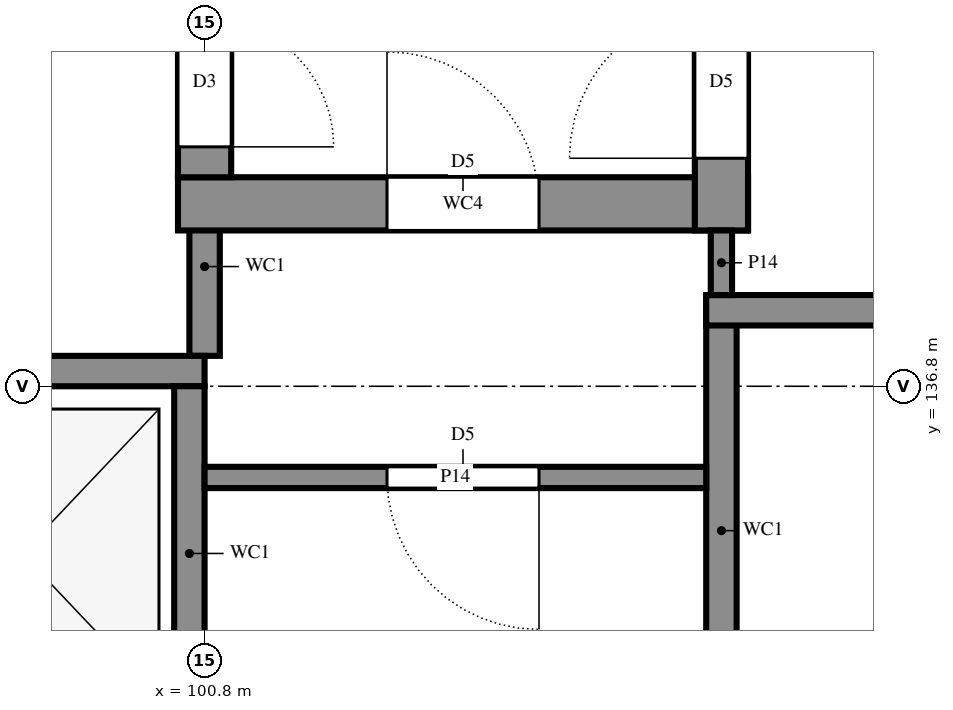
"""IFC4 building model, lengths in metres.
Left out: names, types, materials, properties, quantities, classifications, styles, units other than length and angle.
Written with IfcOpenShell. Run it as: python <this file> out.ifc"""

import sys

from ifc_helpers import new_model, si_unit, direction, frame, frame_2d, origin, place, context, subcontext, project, spatial, rectangle, extrude, element, fill, save


model = new_model("IFC4")
c1 = context("Model", 3, precision=1e-05, world=origin(), true_north=direction((0.0, 1.0)))
c2 = subcontext(c1, "Body", "Model", "MODEL_VIEW")
j1 = project(units=[si_unit("LENGTHUNIT", "METRE"), si_unit("PLANEANGLEUNIT", "RADIAN")], contexts=[c1])
p1 = place(None, origin())
s1 = spatial("IfcSite", under=j1, at=p1, CompositionType="ELEMENT")
p2 = place(p1, origin())
s2 = spatial("IfcBuilding", under=s1, at=p2, CompositionType="ELEMENT")
p3 = place(p2, frame((0.0, 0.0, 7.2)))
s3 = spatial("IfcBuildingStorey", under=s2, at=p3, CompositionType="ELEMENT", Elevation=7.2)
p4 = place(p3, frame((100.8, 137.0, 0.0), z_axis=(0.0, 0.0, 1.0), x_axis=(0.0, 1.0, 0.0)))
e1 = element("IfcWall", 1, at=p4, inside=s3, PredefinedType="SHEAR", context=c2, shape_type="SweptSolid", body=[
    extrude(rectangle(XDim=1.175, YDim=0.2, at=frame_2d((0.587, 0.0))), origin(), (0.0, 0.0, 1.0), 3.6),
])
p5 = place(p3, frame((104.2, 137.4, 0.0), z_axis=(0.0, 0.0, 1.0), x_axis=(0.0, -1.0, 0.0)))
e2 = element("IfcWall", 2, at=p5, inside=s3, PredefinedType="SHEAR", context=c2, shape_type="SweptSolid", body=[
    extrude(rectangle(XDim=3.1, YDim=0.2, at=frame_2d((1.55, 0.0))), origin(), (0.0, 0.0, 1.0), 3.6),
])
p6 = place(p3, frame((108.2, 137.3, 0.0), z_axis=(0.0, 0.0, 1.0), x_axis=(-1.0, 0.0, 0.0)))
e3 = element("IfcWall", 3, at=p6, inside=s3, PredefinedType="SHEAR", context=c2, shape_type="SweptSolid", body=[
    extrude(rectangle(XDim=4.1, YDim=0.2, at=frame_2d((2.05, 0.0))), origin(), (0.0, 0.0, 1.0), 3.6),
])
p7 = place(p3, frame((100.625, 138.0, 0.0), z_axis=(0.0, 0.0, 1.0), x_axis=(1.0, 0.0, 0.0)))
e4 = element("IfcWall", 4, at=p7, inside=s3, PredefinedType="SHEAR", context=c2, shape_type="SweptSolid", body=[
    extrude(rectangle(XDim=3.75, YDim=0.35, at=frame_2d((1.875, 0.0))), origin(), (0.0, 0.0, 1.0), 3.6),
])
p8 = place(p7, frame((1.375, 0.0, 0.0)))
e5 = element("IfcOpeningElement", 5, at=p8, cuts=e4, PredefinedType="OPENING", context=c2, shape_type="SweptSolid", body=[
    extrude(rectangle(XDim=1.0, YDim=2.1, at=frame_2d((0.5, 1.05))), frame((0.0, 0.185, 0.0), z_axis=(0.0, -1.0, 0.0), x_axis=(1.0, 0.0, 0.0)), (0.0, 0.0, 1.0), 0.37),
])
p9 = place(p3, frame((104.2, 137.825, 0.0), z_axis=(0.0, 0.0, 1.0), x_axis=(0.0, 1.0, 0.0)))
e6 = element("IfcWall", 6, at=p9, inside=s3, PredefinedType="SHEAR", context=c2, shape_type="SweptSolid", body=[
    extrude(rectangle(XDim=3.475, YDim=0.35, at=frame_2d((1.738, 0.0))), origin(), (0.0, 0.0, 1.0), 3.6),
])
p10 = place(p9, frame((0.475, 0.0, 0.0)))
e7 = element("IfcOpeningElement", 7, at=p10, cuts=e6, PredefinedType="OPENING", context=c2, shape_type="SweptSolid", body=[
    extrude(rectangle(XDim=1.0, YDim=2.1, at=frame_2d((0.5, 1.05))), frame((0.0, 0.185, 0.0), z_axis=(0.0, -1.0, 0.0), x_axis=(1.0, 0.0, 0.0)), (0.0, 0.0, 1.0), 0.37),
])
p11 = place(p3, frame((100.8, 144.175, 0.0), z_axis=(0.0, 0.0, 1.0), x_axis=(0.0, -1.0, 0.0)))
e8 = element("IfcWall", 8, at=p11, inside=s3, PredefinedType="SHEAR", context=c2, shape_type="SweptSolid", body=[
    extrude(rectangle(XDim=6.0, YDim=0.35, at=frame_2d((3.0, 0.0))), origin(), (0.0, 0.0, 1.0), 3.6),
])
p12 = place(p11, frame((4.95, 0.0, 0.0)))
e9 = element("IfcOpeningElement", 9, at=p12, cuts=e8, PredefinedType="OPENING", context=c2, shape_type="SweptSolid", body=[
    extrude(rectangle(XDim=0.85, YDim=2.1, at=frame_2d((0.425, 1.05))), frame((0.0, 0.185, 0.0), z_axis=(0.0, -1.0, 0.0), x_axis=(1.0, 0.0, 0.0)), (0.0, 0.0, 1.0), 0.37),
])
p13 = place(p3, frame((98.4, 136.9, 0.0), z_axis=(0.0, 0.0, 1.0), x_axis=(1.0, 0.0, 0.0)))
e10 = element("IfcWall", 10, at=p13, inside=s3, PredefinedType="SHEAR", context=c2, shape_type="SweptSolid", body=[
    extrude(rectangle(XDim=2.4, YDim=0.2, at=frame_2d((1.2, 0.0))), origin(), (0.0, 0.0, 1.0), 3.6),
])
p14 = place(p3, frame((100.7, 134.6, 0.0), z_axis=(0.0, 0.0, 1.0), x_axis=(0.0, 1.0, 0.0)))
e11 = element("IfcWall", 11, at=p14, inside=s3, PredefinedType="SHEAR", context=c2, shape_type="SweptSolid", body=[
    extrude(rectangle(XDim=2.2, YDim=0.2, at=frame_2d((1.1, 0.0))), origin(), (0.0, 0.0, 1.0), 3.6),
])
p15 = place(p3, frame((100.8, 136.2, 0.0), z_axis=(0.0, 0.0, 1.0), x_axis=(1.0, 0.0, 0.0)))
e12 = element("IfcWall", 12, at=p15, inside=s3, PredefinedType="PARTITIONING", context=c2, shape_type="SweptSolid", body=[
    extrude(rectangle(XDim=3.3, YDim=0.14, at=frame_2d((1.65, 0.0))), origin(), (0.0, 0.0, 1.0), 3.42),
])
p16 = place(p15, frame((1.2, 0.0, 0.0)))
e13 = element("IfcOpeningElement", 13, at=p16, cuts=e12, PredefinedType="OPENING", context=c2, shape_type="SweptSolid", body=[
    extrude(rectangle(XDim=1.0, YDim=2.1, at=frame_2d((0.5, 1.05))), frame((0.0, 0.08, 0.0), z_axis=(0.0, -1.0, 0.0), x_axis=(1.0, 0.0, 0.0)), (0.0, 0.0, 1.0), 0.16),
])
p17 = place(p3, frame((104.2, 137.4, 0.0), z_axis=(0.0, 0.0, 1.0), x_axis=(0.0, 1.0, 0.0)))
e14 = element("IfcWall", 14, at=p17, inside=s3, PredefinedType="PARTITIONING", context=c2, shape_type="SweptSolid", body=[
    extrude(rectangle(XDim=0.425, YDim=0.14, at=frame_2d((0.212, 0.0))), origin(), (0.0, 0.0, 1.0), 3.42),
])
p18 = place(p16, frame((1.0, 0.0, 0.0), z_axis=(0.0, 0.0, 1.0), x_axis=(-1.0, 0.0, 0.0)))
e15 = element("IfcDoor", 15, at=p18, inside=s3, OperationType="SINGLE_SWING_RIGHT", PredefinedType="DOOR", context=c2, shape_type="SweptSolid", body=[
    extrude(rectangle(XDim=1.0, YDim=2.1, at=frame_2d((0.5, 1.05))), frame((0.0, 0.025, 0.0), z_axis=(0.0, -1.0, 0.0), x_axis=(1.0, 0.0, 0.0)), (0.0, 0.0, 1.0), 0.05),
])
fill(e13, e15)
p19 = place(p8, origin())
e16 = element("IfcDoor", 16, at=p19, inside=s3, OperationType="SINGLE_SWING_RIGHT", PredefinedType="DOOR", context=c2, shape_type="SweptSolid", body=[
    extrude(rectangle(XDim=1.0, YDim=2.1, at=frame_2d((0.5, 1.05))), frame((0.0, 0.025, 0.0), z_axis=(0.0, -1.0, 0.0), x_axis=(1.0, 0.0, 0.0)), (0.0, 0.0, 1.0), 0.05),
])
fill(e5, e16)
p20 = place(p12, origin())
e17 = element("IfcDoor", 17, at=p20, inside=s3, OperationType="SINGLE_SWING_LEFT", PredefinedType="DOOR", context=c2, shape_type="SweptSolid", body=[
    extrude(rectangle(XDim=0.85, YDim=2.1, at=frame_2d((0.425, 1.05))), frame((0.0, 0.025, 0.0), z_axis=(0.0, -1.0, 0.0), x_axis=(1.0, 0.0, 0.0)), (0.0, 0.0, 1.0), 0.05),
])
fill(e9, e17)
p21 = place(p10, origin())
e18 = element("IfcDoor", 18, at=p21, inside=s3, OperationType="SINGLE_SWING_RIGHT", PredefinedType="DOOR", context=c2, shape_type="SweptSolid", body=[
    extrude(rectangle(XDim=1.0, YDim=2.1, at=frame_2d((0.5, 1.05))), frame((0.0, 0.025, 0.0), z_axis=(0.0, -1.0, 0.0), x_axis=(1.0, 0.0, 0.0)), (0.0, 0.0, 1.0), 0.05),
])
fill(e7, e18)
save(model, sys.argv[1])
